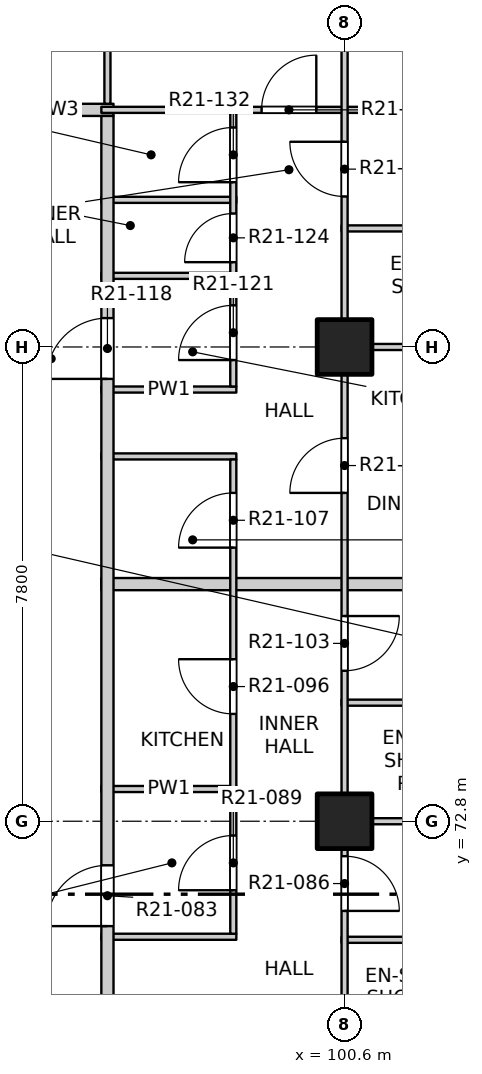
"""IFC4 building model, lengths in metres.
Left out: names, types, materials, properties, quantities, classifications, styles, units other than length and angle.
Written with IfcOpenShell. Run it as: python <this file> out.ifc"""

import sys

from ifc_helpers import new_model, si_unit, direction, frame, frame_2d, origin, origin_2d, place, context, subcontext, project, spatial, rectangle, extrude, element, fill, save


model = new_model("IFC4")
c1 = context("Model", 3, precision=1e-05, world=origin(), true_north=direction((0.0, 1.0)))
c2 = subcontext(c1, "Body", "Model", "MODEL_VIEW")
j1 = project(units=[si_unit("LENGTHUNIT", "METRE"), si_unit("PLANEANGLEUNIT", "RADIAN")], contexts=[c1])
p1 = place(None, origin())
s1 = spatial("IfcSite", under=j1, at=p1, CompositionType="ELEMENT")
p2 = place(p1, origin())
s2 = spatial("IfcBuilding", under=s1, at=p2, CompositionType="ELEMENT")
p3 = place(p2, frame((0.0, 0.0, 214.3)))
s3 = spatial("IfcBuildingStorey", under=s2, at=p3, CompositionType="ELEMENT", Elevation=214.3)
for number, where, z_axis, x_axis in (
    (1, (100.6, 72.8, -0.25), (0.0, 0.0, 1.0), (1.0, 0.0, 0.0)),
    (2, (100.6, 80.6, -0.25), (0.0, 0.0, 1.0), (1.0, 0.0, 0.0)),
):
    element("IfcColumn", number, at=place(p3, frame(where, z_axis=z_axis, x_axis=x_axis)), inside=s3, PredefinedType="COLUMN", context=c2, shape_type="SweptSolid", body=[
        extrude(rectangle(XDim=0.9, YDim=0.9, at=origin_2d()), origin(), (0.0, 0.0, 1.0), 3.4),
    ])
p4 = place(p3, frame((100.55, 70.85, 0.0), z_axis=(0.0, 0.0, 1.0), x_axis=(1.0, 0.0, 0.0)))
e3 = element("IfcWall", 3, at=p4, inside=s3, PredefinedType="PARTITIONING", context=c2, shape_type="SweptSolid", body=[
    extrude(rectangle(XDim=3.4, YDim=0.1, at=frame_2d((1.7, 0.0))), origin(), (0.0, 0.0, 1.0), 3.15),
])
p5 = place(p3, frame((96.6, 70.9, 0.0), z_axis=(0.0, 0.0, 1.0), x_axis=(1.0, 0.0, 0.0)))
e4 = element("IfcWall", 4, at=p5, inside=s3, PredefinedType="PARTITIONING", context=c2, shape_type="SweptSolid", body=[
    extrude(rectangle(XDim=2.22, YDim=0.1, at=frame_2d((1.11, 0.0))), origin(), (0.0, 0.0, 1.0), 3.15),
])
p6 = place(p3, frame((100.55, 72.8, 0.0), z_axis=(0.0, 0.0, 1.0), x_axis=(1.0, 0.0, 0.0)))
e5 = element("IfcWall", 5, at=p6, inside=s3, PredefinedType="PARTITIONING", context=c2, shape_type="SweptSolid", body=[
    extrude(rectangle(XDim=7.55, YDim=0.1, at=frame_2d((3.775, 0.0))), origin(), (0.0, 0.0, 1.0), 3.15),
])
p7 = place(p3, frame((96.6, 73.33, 0.0), z_axis=(0.0, 0.0, 1.0), x_axis=(1.0, 0.0, 0.0)))
e6 = element("IfcWall", 6, at=p7, inside=s3, PredefinedType="PARTITIONING", context=c2, shape_type="SweptSolid", body=[
    extrude(rectangle(XDim=2.22, YDim=0.1, at=frame_2d((1.11, 0.0))), origin(), (0.0, 0.0, 1.0), 3.15),
])
p8 = place(p3, frame((100.55, 74.75, 0.0), z_axis=(0.0, 0.0, 1.0), x_axis=(1.0, 0.0, 0.0)))
e7 = element("IfcWall", 7, at=p8, inside=s3, PredefinedType="PARTITIONING", context=c2, shape_type="SweptSolid", body=[
    extrude(rectangle(XDim=3.4, YDim=0.1, at=frame_2d((1.7, 0.0))), origin(), (0.0, 0.0, 1.0), 3.15),
])
p9 = place(p3, frame((96.6, 76.7, 0.0), z_axis=(0.0, 0.0, 1.0), x_axis=(1.0, 0.0, 0.0)))
e8 = element("IfcWall", 8, at=p9, inside=s3, PredefinedType="PARTITIONING", context=c2, shape_type="SweptSolid", body=[
    extrude(rectangle(XDim=11.5, YDim=0.2, at=frame_2d((5.75, 0.0))), origin(), (0.0, 0.0, 1.0), 2.55),
])
for number, where, z_axis, x_axis in (
    (9, (96.6, 78.8, 0.0), (0.0, 0.0, 1.0), (1.0, 0.0, 0.0)),
    (10, (96.6, 79.9, 0.0), (0.0, 0.0, 1.0), (1.0, 0.0, 0.0)),
):
    element("IfcWall", number, at=place(p3, frame(where, z_axis=z_axis, x_axis=x_axis)), inside=s3, PredefinedType="PARTITIONING", context=c2, shape_type="SweptSolid", body=[
        extrude(rectangle(XDim=2.22, YDim=0.1, at=frame_2d((1.11, 0.0))), origin(), (0.0, 0.0, 1.0), 3.15),
    ])
p10 = place(p3, frame((100.55, 80.6, 0.0), z_axis=(0.0, 0.0, 1.0), x_axis=(1.0, 0.0, 0.0)))
e11 = element("IfcWall", 11, at=p10, inside=s3, PredefinedType="PARTITIONING", context=c2, shape_type="SweptSolid", body=[
    extrude(rectangle(XDim=7.55, YDim=0.1, at=frame_2d((3.775, 0.0))), origin(), (0.0, 0.0, 1.0), 3.15),
])
p11 = place(p3, frame((96.6, 81.77, 0.0), z_axis=(0.0, 0.0, 1.0), x_axis=(1.0, 0.0, 0.0)))
e12 = element("IfcWall", 12, at=p11, inside=s3, PredefinedType="PARTITIONING", context=c2, shape_type="SweptSolid", body=[
    extrude(rectangle(XDim=2.22, YDim=0.1, at=frame_2d((1.11, 0.0))), origin(), (0.0, 0.0, 1.0), 3.15),
])
p12 = place(p3, frame((100.55, 82.55, 0.0), z_axis=(0.0, 0.0, 1.0), x_axis=(1.0, 0.0, 0.0)))
e13 = element("IfcWall", 13, at=p12, inside=s3, PredefinedType="PARTITIONING", context=c2, shape_type="SweptSolid", body=[
    extrude(rectangle(XDim=3.7, YDim=0.1, at=frame_2d((1.85, 0.0))), origin(), (0.0, 0.0, 1.0), 3.15),
])
p13 = place(p3, frame((96.6, 83.02, 0.0), z_axis=(0.0, 0.0, 1.0), x_axis=(1.0, 0.0, 0.0)))
e14 = element("IfcWall", 14, at=p13, inside=s3, PredefinedType="PARTITIONING", context=c2, shape_type="SweptSolid", body=[
    extrude(rectangle(XDim=2.22, YDim=0.1, at=frame_2d((1.11, 0.0))), origin(), (0.0, 0.0, 1.0), 3.15),
])
p14 = place(p3, frame((94.95, 84.5, 0.0), z_axis=(0.0, 0.0, 1.0), x_axis=(1.0, 0.0, 0.0)))
e15 = element("IfcWall", 15, at=p14, inside=s3, PredefinedType="PARTITIONING", context=c2, shape_type="SweptSolid", body=[
    extrude(rectangle(XDim=1.85, YDim=0.2, at=frame_2d((0.925, 0.0))), origin(), (0.0, 0.0, 1.0), 3.15),
])
p15 = place(p3, frame((96.6, 84.5, 0.0), z_axis=(0.0, 0.0, 1.0), x_axis=(1.0, 0.0, 0.0)))
e16 = element("IfcWall", 16, at=p15, inside=s3, PredefinedType="PARTITIONING", context=c2, shape_type="SweptSolid", body=[
    extrude(rectangle(XDim=11.5, YDim=0.1, at=frame_2d((5.75, 0.0))), origin(), (0.0, 0.0, 1.0), 3.15),
])
p16 = place(p15, frame((2.635, 0.0, 0.0)))
e17 = element("IfcOpeningElement", 17, at=p16, cuts=e16, PredefinedType="OPENING", context=c2, shape_type="SweptSolid", body=[
    extrude(rectangle(XDim=0.9, YDim=2.1, at=frame_2d((0.45, 1.05))), frame((0.0, 0.06, 0.0), z_axis=(0.0, -1.0, 0.0), x_axis=(1.0, 0.0, 0.0)), (0.0, 0.0, 1.0), 0.12),
])
p17 = place(p3, frame((96.7, 49.5, 0.0), z_axis=(0.0, 0.0, 1.0), x_axis=(0.0, 1.0, 0.0)))
e18 = element("IfcWall", 18, at=p17, inside=s3, PredefinedType="PARTITIONING", context=c2, shape_type="SweptSolid", body=[
    extrude(rectangle(XDim=34.9, YDim=0.2, at=frame_2d((17.45, 0.0))), origin(), (0.0, 0.0, 1.0), 3.15),
])
p18 = place(p17, frame((3.275, 0.0, 0.0)))
e19 = element("IfcOpeningElement", 19, at=p18, cuts=e18, PredefinedType="OPENING", context=c2, shape_type="SweptSolid", body=[
    extrude(rectangle(XDim=1.0, YDim=2.1, at=frame_2d((0.5, 1.05))), frame((0.0, 0.11, 0.0), z_axis=(0.0, -1.0, 0.0), x_axis=(1.0, 0.0, 0.0)), (0.0, 0.0, 1.0), 0.22),
])
p19 = place(p17, frame((10.825, 0.0, 0.0)))
e20 = element("IfcOpeningElement", 20, at=p19, cuts=e18, PredefinedType="OPENING", context=c2, shape_type="SweptSolid", body=[
    extrude(rectangle(XDim=1.0, YDim=2.1, at=frame_2d((0.5, 1.05))), frame((0.0, 0.11, 0.0), z_axis=(0.0, -1.0, 0.0), x_axis=(1.0, 0.0, 0.0)), (0.0, 0.0, 1.0), 0.22),
])
p20 = place(p17, frame((21.575, 0.0, 0.0)))
e21 = element("IfcOpeningElement", 21, at=p20, cuts=e18, PredefinedType="OPENING", context=c2, shape_type="SweptSolid", body=[
    extrude(rectangle(XDim=1.0, YDim=2.1, at=frame_2d((0.5, 1.05))), frame((0.0, 0.11, 0.0), z_axis=(0.0, -1.0, 0.0), x_axis=(1.0, 0.0, 0.0)), (0.0, 0.0, 1.0), 0.22),
])
p21 = place(p17, frame((30.575, 0.0, 0.0)))
e22 = element("IfcOpeningElement", 22, at=p21, cuts=e18, PredefinedType="OPENING", context=c2, shape_type="SweptSolid", body=[
    extrude(rectangle(XDim=1.0, YDim=2.1, at=frame_2d((0.5, 1.05))), frame((0.0, 0.11, 0.0), z_axis=(0.0, -1.0, 0.0), x_axis=(1.0, 0.0, 0.0)), (0.0, 0.0, 1.0), 0.22),
])
p22 = place(p3, frame((96.7, 84.6, 0.0), z_axis=(0.0, 0.0, 1.0), x_axis=(0.0, 1.0, 0.0)))
e23 = element("IfcWall", 23, at=p22, inside=s3, PredefinedType="PARTITIONING", context=c2, shape_type="SweptSolid", body=[
    extrude(rectangle(XDim=3.5, YDim=0.1, at=frame_2d((1.75, 0.0))), origin(), (0.0, 0.0, 1.0), 3.15),
])
p23 = place(p22, frame((1.4, 0.0, 0.0)))
e24 = element("IfcOpeningElement", 24, at=p23, cuts=e23, PredefinedType="OPENING", context=c2, shape_type="SweptSolid", body=[
    extrude(rectangle(XDim=0.9, YDim=2.1, at=frame_2d((0.45, 1.05))), frame((0.0, 0.06, 0.0), z_axis=(0.0, -1.0, 0.0), x_axis=(1.0, 0.0, 0.0)), (0.0, 0.0, 1.0), 0.12),
])
p24 = place(p3, frame((98.77, 70.95, 0.0), z_axis=(0.0, 0.0, 1.0), x_axis=(0.0, 1.0, 0.0)))
e25 = element("IfcWall", 25, at=p24, inside=s3, PredefinedType="PARTITIONING", context=c2, shape_type="SweptSolid", body=[
    extrude(rectangle(XDim=7.8, YDim=0.1, at=frame_2d((3.9, 0.0))), origin(), (0.0, 0.0, 1.0), 3.15),
])
p25 = place(p24, frame((0.715, 0.0, 0.0)))
e26 = element("IfcOpeningElement", 26, at=p25, cuts=e25, PredefinedType="OPENING", context=c2, shape_type="SweptSolid", body=[
    extrude(rectangle(XDim=0.9, YDim=2.1, at=frame_2d((0.45, 1.05))), frame((0.0, 0.06, 0.0), z_axis=(0.0, -1.0, 0.0), x_axis=(1.0, 0.0, 0.0)), (0.0, 0.0, 1.0), 0.12),
])
p26 = place(p24, frame((3.615, 0.0, 0.0)))
e27 = element("IfcOpeningElement", 27, at=p26, cuts=e25, PredefinedType="OPENING", context=c2, shape_type="SweptSolid", body=[
    extrude(rectangle(XDim=0.9, YDim=2.1, at=frame_2d((0.45, 1.05))), frame((0.0, 0.06, 0.0), z_axis=(0.0, -1.0, 0.0), x_axis=(1.0, 0.0, 0.0)), (0.0, 0.0, 1.0), 0.12),
])
p27 = place(p24, frame((6.35, 0.0, 0.0)))
e28 = element("IfcOpeningElement", 28, at=p27, cuts=e25, PredefinedType="OPENING", context=c2, shape_type="SweptSolid", body=[
    extrude(rectangle(XDim=0.9, YDim=2.1, at=frame_2d((0.45, 1.05))), frame((0.0, 0.06, 0.0), z_axis=(0.0, -1.0, 0.0), x_axis=(1.0, 0.0, 0.0)), (0.0, 0.0, 1.0), 0.12),
])
p28 = place(p3, frame((98.77, 79.95, 0.0), z_axis=(0.0, 0.0, 1.0), x_axis=(0.0, 1.0, 0.0)))
e29 = element("IfcWall", 29, at=p28, inside=s3, PredefinedType="PARTITIONING", context=c2, shape_type="SweptSolid", body=[
    extrude(rectangle(XDim=4.5, YDim=0.1, at=frame_2d((2.25, 0.0))), origin(), (0.0, 0.0, 1.0), 3.15),
])
p29 = place(p28, frame((0.435, 0.0, 0.0)))
e30 = element("IfcOpeningElement", 30, at=p29, cuts=e29, PredefinedType="OPENING", context=c2, shape_type="SweptSolid", body=[
    extrude(rectangle(XDim=0.9, YDim=2.1, at=frame_2d((0.45, 1.05))), frame((0.0, 0.06, 0.0), z_axis=(0.0, -1.0, 0.0), x_axis=(1.0, 0.0, 0.0)), (0.0, 0.0, 1.0), 0.12),
])
p30 = place(p28, frame((2.045, 0.0, 0.0)))
e31 = element("IfcOpeningElement", 31, at=p30, cuts=e29, PredefinedType="OPENING", context=c2, shape_type="SweptSolid", body=[
    extrude(rectangle(XDim=0.8, YDim=2.1, at=frame_2d((0.4, 1.05))), frame((0.0, 0.06, 0.0), z_axis=(0.0, -1.0, 0.0), x_axis=(1.0, 0.0, 0.0)), (0.0, 0.0, 1.0), 0.12),
])
p31 = place(p28, frame((3.36, 0.0, 0.0)))
e32 = element("IfcOpeningElement", 32, at=p31, cuts=e29, PredefinedType="OPENING", context=c2, shape_type="SweptSolid", body=[
    extrude(rectangle(XDim=0.9, YDim=2.1, at=frame_2d((0.45, 1.05))), frame((0.0, 0.06, 0.0), z_axis=(0.0, -1.0, 0.0), x_axis=(1.0, 0.0, 0.0)), (0.0, 0.0, 1.0), 0.12),
])
p32 = place(p3, frame((100.6, 41.9, 0.0), z_axis=(0.0, 0.0, 1.0), x_axis=(0.0, 1.0, 0.0)))
e33 = element("IfcWall", 33, at=p32, inside=s3, PredefinedType="PARTITIONING", context=c2, shape_type="SweptSolid", body=[
    extrude(rectangle(XDim=46.2, YDim=0.1, at=frame_2d((23.1, 0.0))), origin(), (0.0, 0.0, 1.0), 3.15),
])
p33 = place(p32, frame((1.2, 0.0, 0.0)))
e34 = element("IfcOpeningElement", 34, at=p33, cuts=e33, PredefinedType="OPENING", context=c2, shape_type="SweptSolid", body=[
    extrude(rectangle(XDim=0.9, YDim=2.1, at=frame_2d((0.45, 1.05))), frame((0.0, 0.06, 0.0), z_axis=(0.0, -1.0, 0.0), x_axis=(1.0, 0.0, 0.0)), (0.0, 0.0, 1.0), 0.12),
])
p34 = place(p32, frame((6.025, 0.0, 0.0)))
e35 = element("IfcOpeningElement", 35, at=p34, cuts=e33, PredefinedType="OPENING", context=c2, shape_type="SweptSolid", body=[
    extrude(rectangle(XDim=0.9, YDim=2.1, at=frame_2d((0.45, 1.05))), frame((0.0, 0.06, 0.0), z_axis=(0.0, -1.0, 0.0), x_axis=(1.0, 0.0, 0.0)), (0.0, 0.0, 1.0), 0.12),
])
p35 = place(p32, frame((9.0, 0.0, 0.0)))
e36 = element("IfcOpeningElement", 36, at=p35, cuts=e33, PredefinedType="OPENING", context=c2, shape_type="SweptSolid", body=[
    extrude(rectangle(XDim=0.9, YDim=2.1, at=frame_2d((0.45, 1.05))), frame((0.0, 0.06, 0.0), z_axis=(0.0, -1.0, 0.0), x_axis=(1.0, 0.0, 0.0)), (0.0, 0.0, 1.0), 0.12),
])
p36 = place(p32, frame((13.85, 0.0, 0.0)))
e37 = element("IfcOpeningElement", 37, at=p36, cuts=e33, PredefinedType="OPENING", context=c2, shape_type="SweptSolid", body=[
    extrude(rectangle(XDim=0.9, YDim=2.1, at=frame_2d((0.45, 1.05))), frame((0.0, 0.06, 0.0), z_axis=(0.0, -1.0, 0.0), x_axis=(1.0, 0.0, 0.0)), (0.0, 0.0, 1.0), 0.12),
])
p37 = place(p32, frame((16.8, 0.0, 0.0)))
e38 = element("IfcOpeningElement", 38, at=p37, cuts=e33, PredefinedType="OPENING", context=c2, shape_type="SweptSolid", body=[
    extrude(rectangle(XDim=0.9, YDim=2.1, at=frame_2d((0.45, 1.05))), frame((0.0, 0.06, 0.0), z_axis=(0.0, -1.0, 0.0), x_axis=(1.0, 0.0, 0.0)), (0.0, 0.0, 1.0), 0.12),
])
p38 = place(p32, frame((21.625, 0.0, 0.0)))
e39 = element("IfcOpeningElement", 39, at=p38, cuts=e33, PredefinedType="OPENING", context=c2, shape_type="SweptSolid", body=[
    extrude(rectangle(XDim=0.9, YDim=2.1, at=frame_2d((0.45, 1.05))), frame((0.0, 0.06, 0.0), z_axis=(0.0, -1.0, 0.0), x_axis=(1.0, 0.0, 0.0)), (0.0, 0.0, 1.0), 0.12),
])
p39 = place(p32, frame((24.6, 0.0, 0.0)))
e40 = element("IfcOpeningElement", 40, at=p39, cuts=e33, PredefinedType="OPENING", context=c2, shape_type="SweptSolid", body=[
    extrude(rectangle(XDim=0.9, YDim=2.1, at=frame_2d((0.45, 1.05))), frame((0.0, 0.06, 0.0), z_axis=(0.0, -1.0, 0.0), x_axis=(1.0, 0.0, 0.0)), (0.0, 0.0, 1.0), 0.12),
])
p40 = place(p32, frame((29.425, 0.0, 0.0)))
e41 = element("IfcOpeningElement", 41, at=p40, cuts=e33, PredefinedType="OPENING", context=c2, shape_type="SweptSolid", body=[
    extrude(rectangle(XDim=0.9, YDim=2.1, at=frame_2d((0.45, 1.05))), frame((0.0, 0.06, 0.0), z_axis=(0.0, -1.0, 0.0), x_axis=(1.0, 0.0, 0.0)), (0.0, 0.0, 1.0), 0.12),
])
p41 = place(p32, frame((33.375, 0.0, 0.0)))
e42 = element("IfcOpeningElement", 42, at=p41, cuts=e33, PredefinedType="OPENING", context=c2, shape_type="SweptSolid", body=[
    extrude(rectangle(XDim=0.9, YDim=2.1, at=frame_2d((0.45, 1.05))), frame((0.0, 0.06, 0.0), z_axis=(0.0, -1.0, 0.0), x_axis=(1.0, 0.0, 0.0)), (0.0, 0.0, 1.0), 0.12),
])
p42 = place(p32, frame((36.3, 0.0, 0.0)))
e43 = element("IfcOpeningElement", 43, at=p42, cuts=e33, PredefinedType="OPENING", context=c2, shape_type="SweptSolid", body=[
    extrude(rectangle(XDim=0.9, YDim=2.1, at=frame_2d((0.45, 1.05))), frame((0.0, 0.06, 0.0), z_axis=(0.0, -1.0, 0.0), x_axis=(1.0, 0.0, 0.0)), (0.0, 0.0, 1.0), 0.12),
])
p43 = place(p32, frame((41.175, 0.0, 0.0)))
e44 = element("IfcOpeningElement", 44, at=p43, cuts=e33, PredefinedType="OPENING", context=c2, shape_type="SweptSolid", body=[
    extrude(rectangle(XDim=0.9, YDim=2.1, at=frame_2d((0.45, 1.05))), frame((0.0, 0.06, 0.0), z_axis=(0.0, -1.0, 0.0), x_axis=(1.0, 0.0, 0.0)), (0.0, 0.0, 1.0), 0.12),
])
p44 = place(p32, frame((44.1, 0.0, 0.0)))
e45 = element("IfcOpeningElement", 45, at=p44, cuts=e33, PredefinedType="OPENING", context=c2, shape_type="SweptSolid", body=[
    extrude(rectangle(XDim=0.9, YDim=2.1, at=frame_2d((0.45, 1.05))), frame((0.0, 0.06, 0.0), z_axis=(0.0, -1.0, 0.0), x_axis=(1.0, 0.0, 0.0)), (0.0, 0.0, 1.0), 0.12),
])
p45 = place(p20, origin())
e46 = element("IfcDoor", 46, at=p45, inside=s3, OperationType="SINGLE_SWING_LEFT", PredefinedType="DOOR", context=c2, shape_type="SweptSolid", body=[
    extrude(rectangle(XDim=1.0, YDim=2.1, at=frame_2d((0.5, 1.05))), frame((0.0, 0.025, 0.0), z_axis=(0.0, -1.0, 0.0), x_axis=(1.0, 0.0, 0.0)), (0.0, 0.0, 1.0), 0.05),
])
fill(e21, e46)
p46 = place(p40, origin())
e47 = element("IfcDoor", 47, at=p46, inside=s3, OperationType="SINGLE_SWING_RIGHT", PredefinedType="DOOR", context=c2, shape_type="SweptSolid", body=[
    extrude(rectangle(XDim=0.9, YDim=2.1, at=frame_2d((0.45, 1.05))), frame((0.0, 0.025, 0.0), z_axis=(0.0, -1.0, 0.0), x_axis=(1.0, 0.0, 0.0)), (0.0, 0.0, 1.0), 0.05),
])
fill(e41, e47)
p47 = place(p25, origin())
e48 = element("IfcDoor", 48, at=p47, inside=s3, OperationType="SINGLE_SWING_LEFT", PredefinedType="DOOR", context=c2, shape_type="SweptSolid", body=[
    extrude(rectangle(XDim=0.9, YDim=2.1, at=frame_2d((0.45, 1.05))), frame((0.0, 0.025, 0.0), z_axis=(0.0, -1.0, 0.0), x_axis=(1.0, 0.0, 0.0)), (0.0, 0.0, 1.0), 0.05),
])
fill(e26, e48)
p48 = place(p26, origin())
e49 = element("IfcDoor", 49, at=p48, inside=s3, OperationType="SINGLE_SWING_RIGHT", PredefinedType="DOOR", context=c2, shape_type="SweptSolid", body=[
    extrude(rectangle(XDim=0.9, YDim=2.1, at=frame_2d((0.45, 1.05))), frame((0.0, 0.025, 0.0), z_axis=(0.0, -1.0, 0.0), x_axis=(1.0, 0.0, 0.0)), (0.0, 0.0, 1.0), 0.05),
])
fill(e27, e49)
p49 = place(p41, origin())
e50 = element("IfcDoor", 50, at=p49, inside=s3, OperationType="SINGLE_SWING_LEFT", PredefinedType="DOOR", context=c2, shape_type="SweptSolid", body=[
    extrude(rectangle(XDim=0.9, YDim=2.1, at=frame_2d((0.45, 1.05))), frame((0.0, 0.025, 0.0), z_axis=(0.0, -1.0, 0.0), x_axis=(1.0, 0.0, 0.0)), (0.0, 0.0, 1.0), 0.05),
])
fill(e42, e50)
p50 = place(p27, origin())
e51 = element("IfcDoor", 51, at=p50, inside=s3, OperationType="SINGLE_SWING_LEFT", PredefinedType="DOOR", context=c2, shape_type="SweptSolid", body=[
    extrude(rectangle(XDim=0.9, YDim=2.1, at=frame_2d((0.45, 1.05))), frame((0.0, 0.025, 0.0), z_axis=(0.0, -1.0, 0.0), x_axis=(1.0, 0.0, 0.0)), (0.0, 0.0, 1.0), 0.05),
])
fill(e28, e51)
p51 = place(p42, origin())
e52 = element("IfcDoor", 52, at=p51, inside=s3, OperationType="SINGLE_SWING_LEFT", PredefinedType="DOOR", context=c2, shape_type="SweptSolid", body=[
    extrude(rectangle(XDim=0.9, YDim=2.1, at=frame_2d((0.45, 1.05))), frame((0.0, 0.025, 0.0), z_axis=(0.0, -1.0, 0.0), x_axis=(1.0, 0.0, 0.0)), (0.0, 0.0, 1.0), 0.05),
])
fill(e43, e52)
p52 = place(p21, origin())
e53 = element("IfcDoor", 53, at=p52, inside=s3, OperationType="SINGLE_SWING_LEFT", PredefinedType="DOOR", context=c2, shape_type="SweptSolid", body=[
    extrude(rectangle(XDim=1.0, YDim=2.1, at=frame_2d((0.5, 1.05))), frame((0.0, 0.025, 0.0), z_axis=(0.0, -1.0, 0.0), x_axis=(1.0, 0.0, 0.0)), (0.0, 0.0, 1.0), 0.05),
])
fill(e22, e53)
p53 = place(p29, origin())
e54 = element("IfcDoor", 54, at=p53, inside=s3, OperationType="SINGLE_SWING_LEFT", PredefinedType="DOOR", context=c2, shape_type="SweptSolid", body=[
    extrude(rectangle(XDim=0.9, YDim=2.1, at=frame_2d((0.45, 1.05))), frame((0.0, 0.025, 0.0), z_axis=(0.0, -1.0, 0.0), x_axis=(1.0, 0.0, 0.0)), (0.0, 0.0, 1.0), 0.05),
])
fill(e30, e54)
p54 = place(p30, origin())
e55 = element("IfcDoor", 55, at=p54, inside=s3, OperationType="SINGLE_SWING_LEFT", PredefinedType="DOOR", context=c2, shape_type="SweptSolid", body=[
    extrude(rectangle(XDim=0.8, YDim=2.1, at=frame_2d((0.4, 1.05))), frame((0.0, 0.025, 0.0), z_axis=(0.0, -1.0, 0.0), x_axis=(1.0, 0.0, 0.0)), (0.0, 0.0, 1.0), 0.05),
])
fill(e31, e55)
p55 = place(p43, origin())
e56 = element("IfcDoor", 56, at=p55, inside=s3, OperationType="SINGLE_SWING_RIGHT", PredefinedType="DOOR", context=c2, shape_type="SweptSolid", body=[
    extrude(rectangle(XDim=0.9, YDim=2.1, at=frame_2d((0.45, 1.05))), frame((0.0, 0.025, 0.0), z_axis=(0.0, -1.0, 0.0), x_axis=(1.0, 0.0, 0.0)), (0.0, 0.0, 1.0), 0.05),
])
fill(e44, e56)
p56 = place(p31, origin())
e57 = element("IfcDoor", 57, at=p56, inside=s3, OperationType="SINGLE_SWING_LEFT", PredefinedType="DOOR", context=c2, shape_type="SweptSolid", body=[
    extrude(rectangle(XDim=0.9, YDim=2.1, at=frame_2d((0.45, 1.05))), frame((0.0, 0.025, 0.0), z_axis=(0.0, -1.0, 0.0), x_axis=(1.0, 0.0, 0.0)), (0.0, 0.0, 1.0), 0.05),
])
fill(e32, e57)
p57 = place(p16, origin())
e58 = element("IfcDoor", 58, at=p57, inside=s3, OperationType="SINGLE_SWING_RIGHT", PredefinedType="DOOR", context=c2, shape_type="SweptSolid", body=[
    extrude(rectangle(XDim=0.9, YDim=2.1, at=frame_2d((0.45, 1.05))), frame((0.0, 0.025, 0.0), z_axis=(0.0, -1.0, 0.0), x_axis=(1.0, 0.0, 0.0)), (0.0, 0.0, 1.0), 0.05),
])
fill(e17, e58)
save(model, sys.argv[1])
